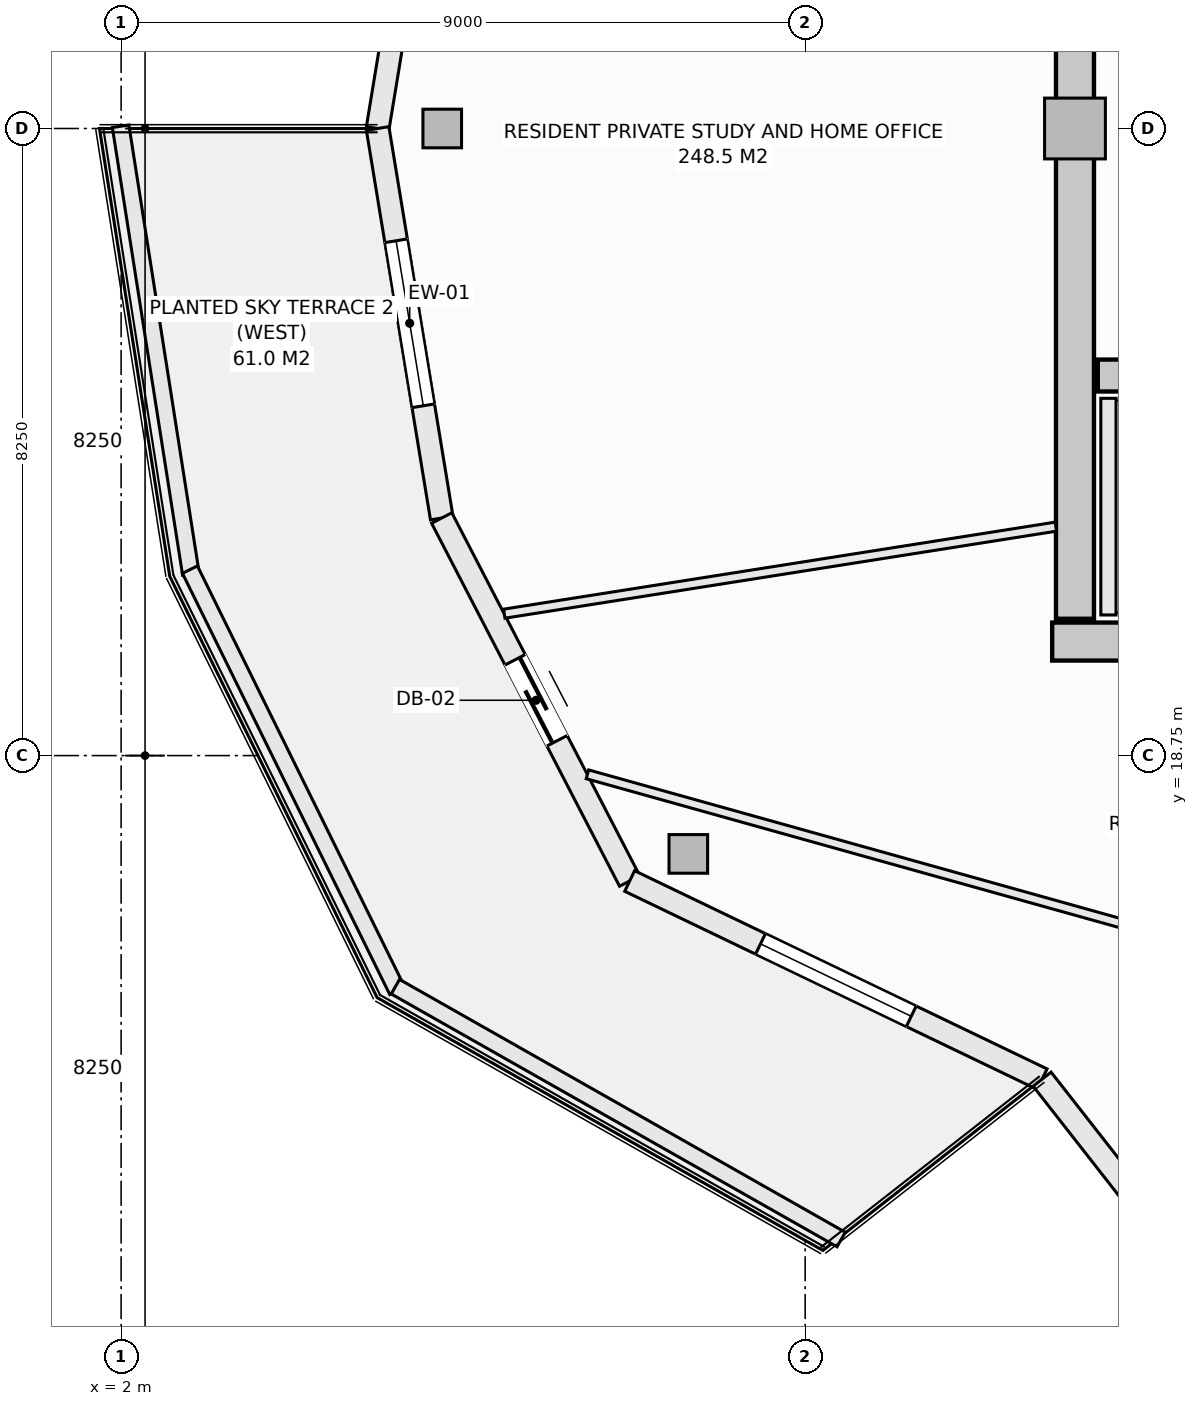
"""IFC4 building model, lengths in metres.
Left out: names, types, materials, properties, quantities, classifications, styles, units other than length and angle.
Written with IfcOpenShell. Run it as: python <this file> out.ifc"""

import sys

from ifc_helpers import new_model, si_unit, direction, frame, frame_2d, origin, origin_2d, place, context, subcontext, project, spatial, rectangle, hollow_rectangle, extrude, element, fill, save


model = new_model("IFC4")
c1 = context("Model", 3, precision=1e-05, world=origin(), true_north=direction((0.0, 1.0)))
c2 = subcontext(c1, "Body", "Model", "MODEL_VIEW")
j1 = project(units=[si_unit("LENGTHUNIT", "METRE"), si_unit("PLANEANGLEUNIT", "RADIAN")], contexts=[c1])
p1 = place(None, origin())
s1 = spatial("IfcSite", under=j1, at=p1, CompositionType="ELEMENT")
p2 = place(p1, origin())
s2 = spatial("IfcBuilding", under=s1, at=p2, CompositionType="ELEMENT")
p3 = place(p2, frame((0.0, 0.0, 222.8)))
s3 = spatial("IfcBuildingStorey", under=s2, at=p3, CompositionType="ELEMENT", Elevation=222.8)
p4 = place(p3, frame((14.25, 20.25, -0.27), z_axis=(0.0, 0.0, 1.0), x_axis=(1.0, 0.0, 0.0)))
e1 = element("IfcWall", 1, at=p4, inside=s3, PredefinedType="SHEAR", context=c2, shape_type="SweptSolid", body=[
    extrude(rectangle(XDim=13.5, YDim=0.5, at=frame_2d((6.75, 0.0))), origin(), (0.0, 0.0, 1.0), 3.3),
])
p5 = place(p3, frame((14.55, 20.55, -0.27), z_axis=(0.0, 0.0, 1.0), x_axis=(0.0, 1.0, 0.0)))
e2 = element("IfcWall", 2, at=p5, inside=s3, PredefinedType="SHEAR", context=c2, shape_type="SweptSolid", body=[
    extrude(rectangle(XDim=12.9, YDim=0.5, at=frame_2d((6.45, 0.0))), origin(), (0.0, 0.0, 1.0), 3.3),
])
p6 = place(p3, frame((14.85, 23.75, -0.27), z_axis=(0.0, 0.0, 1.0), x_axis=(1.0, 0.0, 0.0)))
e3 = element("IfcWall", 3, at=p6, inside=s3, PredefinedType="SHEAR", context=c2, shape_type="SweptSolid", body=[
    extrude(rectangle(XDim=7.3, YDim=0.42, at=frame_2d((3.65, 0.0))), origin(), (0.0, 0.0, 1.0), 3.3),
])
for number, where, z_axis, x_axis in (
    (4, (6.225, 27.0, -0.27), (0.0, 0.0, 1.0), (1.0, 0.0, 0.0)),
    (5, (9.463, 17.456, -0.27), (0.0, 0.0, 1.0), (1.0, 0.0, 0.0)),
):
    element("IfcColumn", number, at=place(p3, frame(where, z_axis=z_axis, x_axis=x_axis)), inside=s3, PredefinedType="COLUMN", context=c2, shape_type="SweptSolid", body=[
        extrude(hollow_rectangle(XDim=0.508, YDim=0.508, WallThickness=0.019, at=origin_2d()), origin(), (0.0, 0.0, 1.0), 3.3),
    ])
p7 = place(p3, frame((14.55, 27.0, -0.27), z_axis=(0.0, 0.0, 1.0), x_axis=(1.0, 0.0, 0.0)))
e6 = element("IfcColumn", 6, at=p7, inside=s3, PredefinedType="PILASTER", context=c2, shape_type="SweptSolid", body=[
    extrude(rectangle(XDim=0.8, YDim=0.8, at=origin_2d()), origin(), (0.0, 0.0, 1.0), 3.3),
])
p8 = place(p3, frame((5.375, 27.0, 0.0), z_axis=(0.0, 0.0, 1.0), x_axis=(0.16237087798, 0.986729799886, 0.0)))
e7 = element("IfcWall", 7, at=p8, inside=s3, PredefinedType="SOLIDWALL", context=c2, shape_type="SweptSolid", body=[
    extrude(rectangle(XDim=5.193, YDim=0.3, at=frame_2d((2.597, 0.0))), origin(), (0.0, 0.0, 1.0), 2.605),
])
p9 = place(p8, frame((1.497, 0.0, 0.72)))
e8 = element("IfcOpeningElement", 8, at=p9, cuts=e7, PredefinedType="OPENING", context=c2, shape_type="SweptSolid", body=[
    extrude(rectangle(XDim=2.2, YDim=1.65, at=frame_2d((1.1, 0.825))), frame((0.0, 0.16, 0.0), z_axis=(0.0, -1.0, 0.0), x_axis=(1.0, 0.0, 0.0)), (0.0, 0.0, 1.0), 0.32),
])
p10 = place(p3, frame((5.375, 27.0, 0.0), z_axis=(0.0, 0.0, 1.0), x_axis=(0.16237087798, -0.986729799886, 0.0)))
e9 = element("IfcWall", 9, at=p10, inside=s3, PredefinedType="SOLIDWALL", context=c2, shape_type="SweptSolid", body=[
    extrude(rectangle(XDim=5.193, YDim=0.3, at=frame_2d((2.597, 0.0))), origin(), (0.0, 0.0, 1.0), 2.605),
])
p11 = place(p10, frame((1.497, 0.0, 0.72)))
e10 = element("IfcOpeningElement", 10, at=p11, cuts=e9, PredefinedType="OPENING", context=c2, shape_type="SweptSolid", body=[
    extrude(rectangle(XDim=2.2, YDim=1.65, at=frame_2d((1.1, 0.825))), frame((0.0, 0.16, 0.0), z_axis=(0.0, -1.0, 0.0), x_axis=(1.0, 0.0, 0.0)), (0.0, 0.0, 1.0), 0.32),
])
p12 = place(p3, frame((6.218, 21.875, 0.0), z_axis=(0.0, 0.0, 1.0), x_axis=(0.459808219482, -0.888018243786, 0.0)))
e11 = element("IfcWall", 11, at=p12, inside=s3, PredefinedType="SOLIDWALL", context=c2, shape_type="SweptSolid", body=[
    extrude(rectangle(XDim=5.378, YDim=0.3, at=frame_2d((2.689, 0.0))), origin(), (0.0, 0.0, 1.0), 2.605),
])
p13 = place(p12, frame((2.1, 0.0, 0.0)))
e12 = element("IfcOpeningElement", 12, at=p13, cuts=e11, PredefinedType="OPENING", context=c2, shape_type="SweptSolid", body=[
    extrude(rectangle(XDim=1.2, YDim=2.2, at=frame_2d((0.6, 1.1))), frame((0.0, 0.16, 0.0), z_axis=(0.0, -1.0, 0.0), x_axis=(1.0, 0.0, 0.0)), (0.0, 0.0, 1.0), 0.32),
])
p14 = place(p3, frame((8.691, 17.1, 0.0), z_axis=(0.0, 0.0, 1.0), x_axis=(0.901348331142, -0.433094892545, 0.0)))
e13 = element("IfcWall", 13, at=p14, inside=s3, PredefinedType="SOLIDWALL", context=c2, shape_type="SweptSolid", body=[
    extrude(rectangle(XDim=6.021, YDim=0.3, at=frame_2d((3.01, 0.0))), origin(), (0.0, 0.0, 1.0), 2.605),
])
p15 = place(p14, frame((1.91, 0.0, 0.72)))
e14 = element("IfcOpeningElement", 14, at=p15, cuts=e13, PredefinedType="OPENING", context=c2, shape_type="SweptSolid", body=[
    extrude(rectangle(XDim=2.2, YDim=1.65, at=frame_2d((1.1, 0.825))), frame((0.0, 0.16, 0.0), z_axis=(0.0, -1.0, 0.0), x_axis=(1.0, 0.0, 0.0)), (0.0, 0.0, 1.0), 0.32),
])
p16 = place(p3, frame((14.117, 14.493, 0.0), z_axis=(0.0, 0.0, 1.0), x_axis=(0.616450126935, -0.787393955401, 0.0)))
e15 = element("IfcWall", 15, at=p16, inside=s3, PredefinedType="SOLIDWALL", context=c2, shape_type="SweptSolid", body=[
    extrude(rectangle(XDim=5.893, YDim=0.3, at=frame_2d((2.946, 0.0))), origin(), (0.0, 0.0, 1.0), 2.605),
])
p17 = place(p16, frame((1.846, 0.0, 0.72)))
e16 = element("IfcOpeningElement", 16, at=p17, cuts=e15, PredefinedType="OPENING", context=c2, shape_type="SweptSolid", body=[
    extrude(rectangle(XDim=2.2, YDim=1.65, at=frame_2d((1.1, 0.825))), frame((0.0, 0.16, 0.0), z_axis=(0.0, -1.0, 0.0), x_axis=(1.0, 0.0, 0.0)), (0.0, 0.0, 1.0), 0.32),
])
p18 = place(p3, frame((1.993, 27.029, 0.0), z_axis=(0.0, 0.0, 1.0), x_axis=(0.1550711793, -0.987903299595, 0.0)))
e17 = element("IfcWall", 17, at=p18, inside=s3, PredefinedType="PARAPET", context=c2, shape_type="SweptSolid", body=[
    extrude(rectangle(XDim=5.964, YDim=0.22, at=frame_2d((2.982, 0.0))), origin(), (0.0, 0.0, 1.0), 0.52),
])
p19 = place(p3, frame((2.906, 21.196, 0.0), z_axis=(0.0, 0.0, 1.0), x_axis=(0.441640961804, -0.897191875162, 0.0)))
e18 = element("IfcWall", 18, at=p19, inside=s3, PredefinedType="PARAPET", context=c2, shape_type="SweptSolid", body=[
    extrude(rectangle(XDim=6.178, YDim=0.22, at=frame_2d((3.089, 0.0))), origin(), (0.0, 0.0, 1.0), 0.52),
])
p20 = place(p3, frame((5.608, 15.709, 0.0), z_axis=(0.0, 0.0, 1.0), x_axis=(0.869860619267, -0.493297580623, 0.0)))
e19 = element("IfcWall", 19, at=p20, inside=s3, PredefinedType="PARAPET", context=c2, shape_type="SweptSolid", body=[
    extrude(rectangle(XDim=6.743, YDim=0.22, at=frame_2d((3.371, 0.0))), origin(), (0.0, 0.0, 1.0), 0.52),
])
p21 = place(p3, frame((14.99, 20.6, 0.0), z_axis=(0.0, 0.0, 1.0), x_axis=(0.0, 1.0, 0.0)))
e20 = element("IfcWall", 20, at=p21, inside=s3, PredefinedType="SOLIDWALL", context=c2, shape_type="SweptSolid", body=[
    extrude(rectangle(XDim=2.85, YDim=0.2, at=frame_2d((1.425, 0.0))), origin(), (0.0, 0.0, 1.0), 3.03),
])
p22 = place(p3, frame((7.041, 20.617, 0.0), z_axis=(0.0, 0.0, 1.0), x_axis=(0.987780472541, 0.155851654036, 0.0)))
e21 = element("IfcWall", 21, at=p22, inside=s3, PredefinedType="PARTITIONING", context=c2, shape_type="SweptSolid", body=[
    extrude(rectangle(XDim=7.347, YDim=0.12, at=frame_2d((3.673, 0.0))), origin(), (0.0, 0.0, 1.0), 3.03),
])
p23 = place(p3, frame((8.135, 18.504, 0.0), z_axis=(0.0, 0.0, 1.0), x_axis=(0.963142154711, -0.268992917785, 0.0)))
e22 = element("IfcWall", 22, at=p23, inside=s3, PredefinedType="PARTITIONING", context=c2, shape_type="SweptSolid", body=[
    extrude(rectangle(XDim=19.662, YDim=0.12, at=frame_2d((9.831, 0.0))), origin(), (0.0, 0.0, 1.0), 2.77),
])
p24 = place(p11, origin())
e23 = element("IfcWindow", 23, at=p24, inside=s3, PartitioningType="SINGLE_PANEL", PredefinedType="WINDOW", context=c2, shape_type="SweptSolid", body=[
    extrude(rectangle(XDim=2.2, YDim=1.65, at=frame_2d((1.1, 0.825))), frame((0.0, 0.03, 0.0), z_axis=(0.0, -1.0, 0.0), x_axis=(1.0, 0.0, 0.0)), (0.0, 0.0, 1.0), 0.06),
])
fill(e10, e23)
p25 = place(p13, frame((1.2, 0.0, 0.0), z_axis=(0.0, 0.0, 1.0), x_axis=(-1.0, 0.0, 0.0)))
e24 = element("IfcDoor", 24, at=p25, inside=s3, OperationType="SLIDING_TO_LEFT", PredefinedType="DOOR", context=c2, shape_type="SweptSolid", body=[
    extrude(rectangle(XDim=1.2, YDim=2.2, at=frame_2d((0.6, 1.1))), frame((0.0, 0.025, 0.0), z_axis=(0.0, -1.0, 0.0), x_axis=(1.0, 0.0, 0.0)), (0.0, 0.0, 1.0), 0.05),
])
fill(e12, e24)
p26 = place(p15, origin())
e25 = element("IfcWindow", 25, at=p26, inside=s3, PartitioningType="SINGLE_PANEL", PredefinedType="WINDOW", context=c2, shape_type="SweptSolid", body=[
    extrude(rectangle(XDim=2.2, YDim=1.65, at=frame_2d((1.1, 0.825))), frame((0.0, 0.03, 0.0), z_axis=(0.0, -1.0, 0.0), x_axis=(1.0, 0.0, 0.0)), (0.0, 0.0, 1.0), 0.06),
])
fill(e14, e25)
save(model, sys.argv[1])
